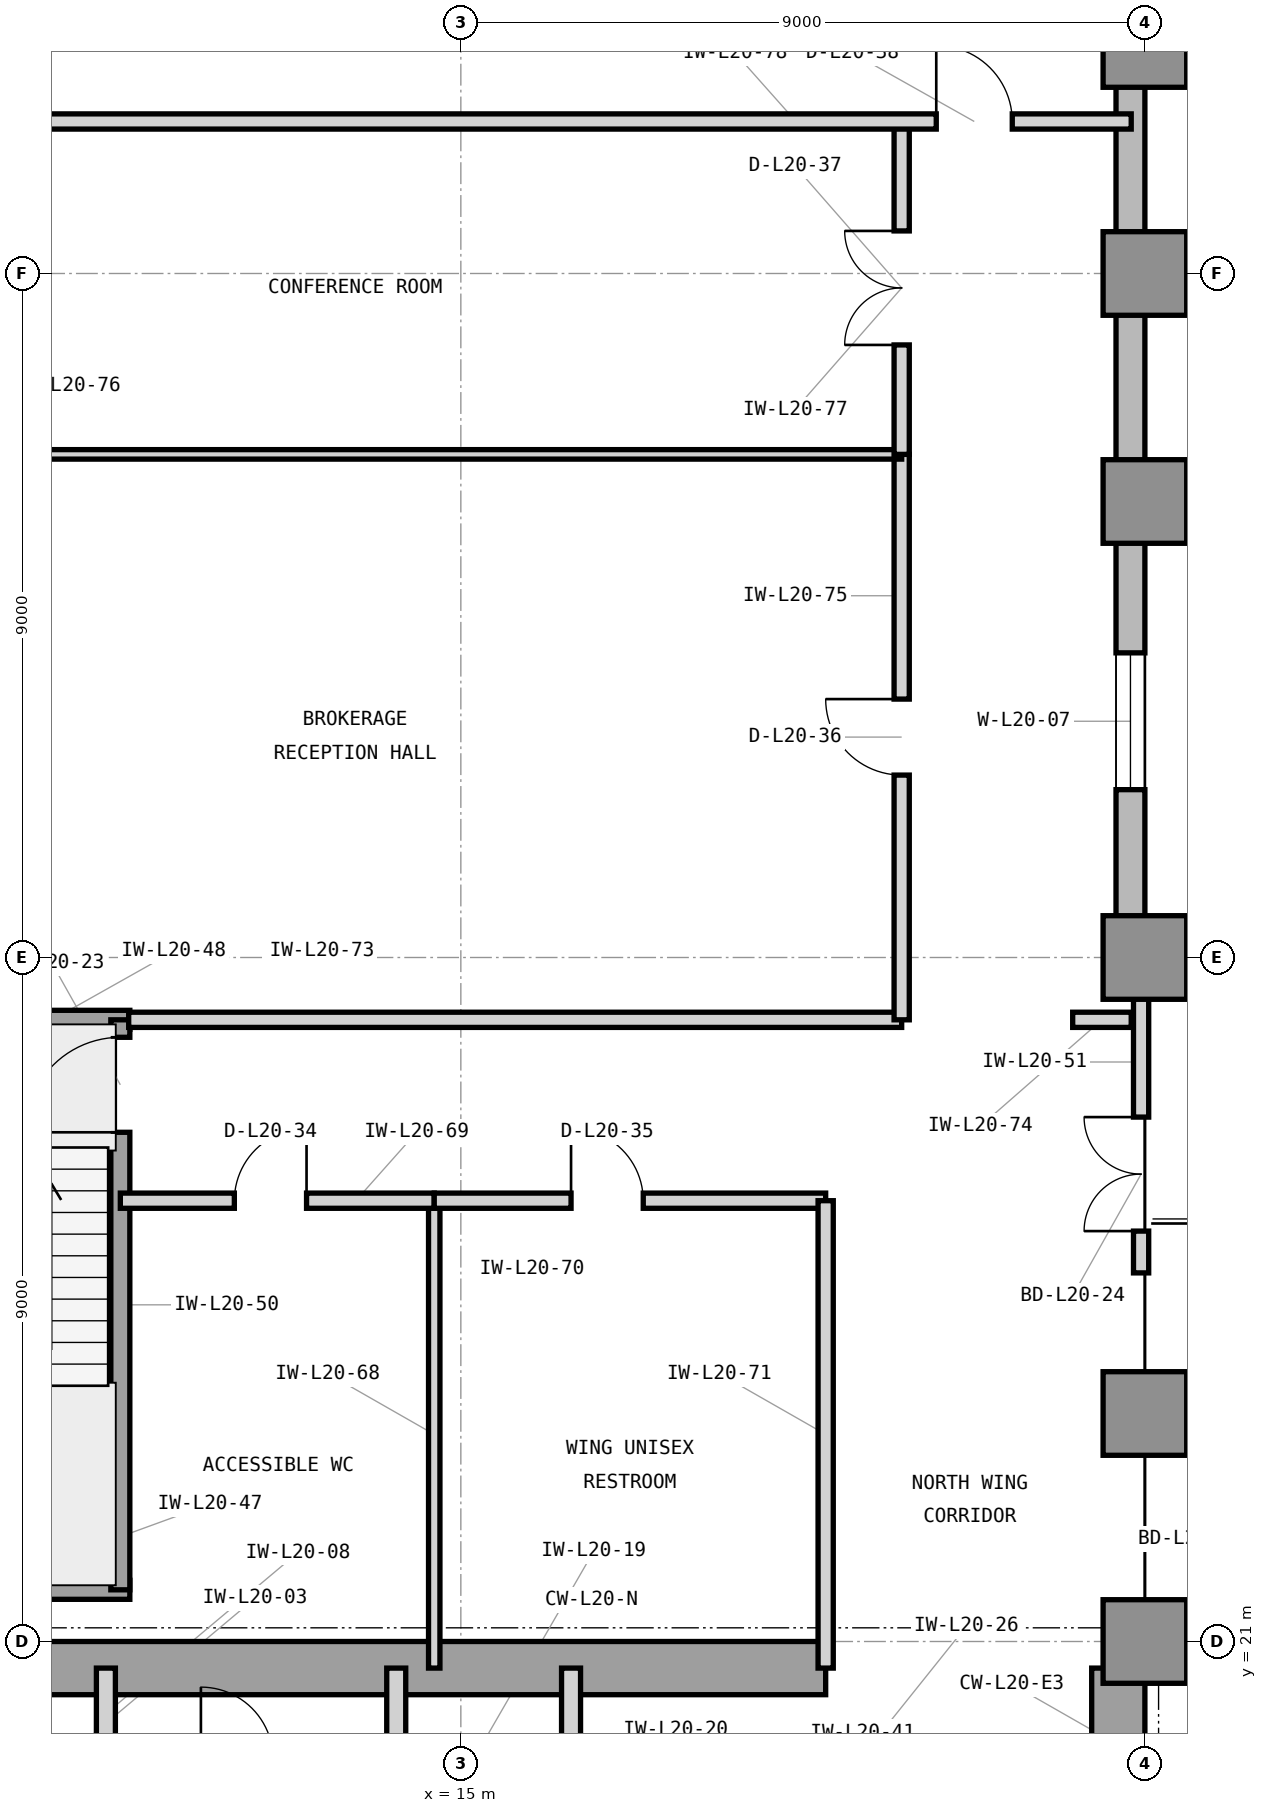
"""IFC4 building model, lengths in metres.
Left out: names, types, materials, properties, quantities, classifications, styles, units other than length and angle.
Written with IfcOpenShell. Run it as: python <this file> out.ifc"""

import sys

from ifc_helpers import new_model, si_unit, direction, frame, frame_2d, origin, origin_2d, place, context, subcontext, project, spatial, rectangle, extrude, element, fill, save


model = new_model("IFC4")
c1 = context("Model", 3, precision=1e-05, world=origin(), true_north=direction((0.0, 1.0)))
c2 = subcontext(c1, "Body", "Model", "MODEL_VIEW")
j1 = project(units=[si_unit("LENGTHUNIT", "METRE"), si_unit("PLANEANGLEUNIT", "RADIAN")], contexts=[c1])
p1 = place(None, origin())
s1 = spatial("IfcSite", under=j1, at=p1, CompositionType="ELEMENT")
p2 = place(p1, origin())
s2 = spatial("IfcBuilding", under=s1, at=p2, CompositionType="ELEMENT")
p3 = place(p2, frame((0.0, 0.0, 89.1)))
s3 = spatial("IfcBuildingStorey", under=s2, at=p3, CompositionType="ELEMENT", Elevation=89.1)
p4 = place(p3, frame((7.475, 20.65, 0.0), z_axis=(0.0, 0.0, 1.0), x_axis=(1.0, 0.0, 0.0)))
e1 = element("IfcWall", 1, at=p4, inside=s3, PredefinedType="SHEAR", context=c2, shape_type="SweptSolid", body=[
    extrude(rectangle(XDim=12.325, YDim=0.7, at=frame_2d((6.163, 0.0))), origin(), (0.0, 0.0, 1.0), 4.2),
])
p5 = place(p3, frame((23.65, 16.6, 0.0), z_axis=(0.0, 0.0, 1.0), x_axis=(0.0, 1.0, 0.0)))
e2 = element("IfcWall", 2, at=p5, inside=s3, PredefinedType="SHEAR", context=c2, shape_type="SweptSolid", body=[
    extrude(rectangle(XDim=4.05, YDim=0.7, at=frame_2d((2.025, 0.0))), origin(), (0.0, 0.0, 1.0), 4.2),
])
for number, where, z_axis, x_axis in (
    (3, (24.0, 21.0, 0.0), (0.0, 0.0, 1.0), (1.0, 0.0, 0.0)),
    (4, (24.0, 24.0, 0.0), (0.0, 0.0, 1.0), (1.0, 0.0, 0.0)),
    (5, (24.0, 30.0, 0.0), (0.0, 0.0, 1.0), (1.0, 0.0, 0.0)),
    (6, (24.0, 36.0, 0.0), (0.0, 0.0, 1.0), (1.0, 0.0, 0.0)),
    (7, (24.0, 39.0, 0.0), (0.0, 0.0, 1.0), (1.0, 0.0, 0.0)),
    (8, (24.0, 42.0, 0.0), (0.0, 0.0, 1.0), (1.0, 0.0, 0.0)),
):
    element("IfcColumn", number, at=place(p3, frame(where, z_axis=z_axis, x_axis=x_axis)), inside=s3, PredefinedType="COLUMN", context=c2, shape_type="SweptSolid", body=[
        extrude(rectangle(XDim=1.1, YDim=1.1, at=origin_2d()), origin(), (0.0, 0.0, 1.0), 4.2),
    ])
p6 = place(p3, frame((23.81, 30.45, 0.0), z_axis=(0.0, 0.0, 1.0), x_axis=(0.0, 1.0, 0.0)))
e9 = element("IfcWall", 9, at=p6, inside=s3, PredefinedType="STANDARD", context=c2, shape_type="SweptSolid", body=[
    extrude(rectangle(XDim=15.95, YDim=0.38, at=frame_2d((7.975, 0.0))), origin(), (0.0, 0.0, 1.0), 4.0),
])
p7 = place(p6, frame((1.758, 0.0, 0.85)))
e10 = element("IfcOpeningElement", 10, at=p7, cuts=e9, PredefinedType="OPENING", context=c2, shape_type="SweptSolid", body=[
    extrude(rectangle(XDim=1.8, YDim=2.25, at=frame_2d((0.9, 1.125))), frame((0.0, 0.2, 0.0), z_axis=(0.0, -1.0, 0.0), x_axis=(1.0, 0.0, 0.0)), (0.0, 0.0, 1.0), 0.4),
])
p8 = place(p3, frame((10.33, 19.45, 0.0), z_axis=(0.0, 0.0, 1.0), x_axis=(0.0, 1.0, 0.0)))
e11 = element("IfcWall", 11, at=p8, inside=s3, PredefinedType="PARTITIONING", context=c2, shape_type="SweptSolid", body=[
    extrude(rectangle(XDim=1.2, YDim=0.25, at=frame_2d((0.6, 0.0))), origin(), (0.0, 0.0, 1.0), 3.217),
])
for number, where, z_axis, x_axis in (
    (12, (14.15, 16.7, 0.0), (0.0, 0.0, 1.0), (0.0, 1.0, 0.0)),
    (13, (16.45, 16.7, 0.0), (0.0, 0.0, 1.0), (0.0, 1.0, 0.0)),
):
    element("IfcWall", number, at=place(p3, frame(where, z_axis=z_axis, x_axis=x_axis)), inside=s3, PredefinedType="PARTITIONING", context=c2, shape_type="SweptSolid", body=[
        extrude(rectangle(XDim=3.95, YDim=0.25, at=frame_2d((1.975, 0.0))), origin(), (0.0, 0.0, 1.0), 3.93),
    ])
for number, where, z_axis, x_axis in (
    (14, (6.555, 21.68, 0.0), (0.0, 0.0, 1.0), (1.0, 0.0, 0.0)),
    (15, (6.555, 29.18, 0.0), (0.0, 0.0, 1.0), (1.0, 0.0, 0.0)),
):
    element("IfcWall", number, at=place(p3, frame(where, z_axis=z_axis, x_axis=x_axis)), inside=s3, PredefinedType="SHEAR", context=c2, shape_type="SweptSolid", body=[
        extrude(rectangle(XDim=4.09, YDim=0.25, at=frame_2d((2.045, 0.0))), origin(), (0.0, 0.0, 1.0), 4.2),
    ])
p9 = place(p3, frame((10.52, 21.68, 0.0), z_axis=(0.0, 0.0, 1.0), x_axis=(0.0, 1.0, 0.0)))
e16 = element("IfcWall", 16, at=p9, inside=s3, PredefinedType="SHEAR", context=c2, shape_type="SweptSolid", body=[
    extrude(rectangle(XDim=7.5, YDim=0.25, at=frame_2d((3.75, 0.0))), origin(), (0.0, 0.0, 1.0), 4.2),
])
p10 = place(p9, frame((6.02, 0.0, 0.0)))
e17 = element("IfcOpeningElement", 17, at=p10, cuts=e16, PredefinedType="OPENING", context=c2, shape_type="SweptSolid", body=[
    extrude(rectangle(XDim=1.25, YDim=2.2, at=frame_2d((0.625, 1.1))), frame((0.0, 0.135, 0.0), z_axis=(0.0, -1.0, 0.0), x_axis=(1.0, 0.0, 0.0)), (0.0, 0.0, 1.0), 0.27),
])
p11 = place(p3, frame((23.95, 25.85, 0.0), z_axis=(0.0, 0.0, 1.0), x_axis=(0.0, 1.0, 0.0)))
e18 = element("IfcWall", 18, at=p11, inside=s3, PredefinedType="PARTITIONING", context=c2, shape_type="SweptSolid", body=[
    extrude(rectangle(XDim=3.7, YDim=0.2, at=frame_2d((1.85, 0.0))), origin(), (0.0, 0.0, 1.0), 3.313),
])
p12 = place(p11, frame((0.55, 0.0, 0.0)))
e19 = element("IfcOpeningElement", 19, at=p12, cuts=e18, PredefinedType="OPENING", context=c2, shape_type="SweptSolid", body=[
    extrude(rectangle(XDim=1.5, YDim=2.3, at=frame_2d((0.75, 1.15))), frame((0.0, 0.11, 0.0), z_axis=(0.0, -1.0, 0.0), x_axis=(1.0, 0.0, 0.0)), (0.0, 0.0, 1.0), 0.22),
])
p13 = place(p3, frame((24.05, 20.95, 0.0), z_axis=(0.0, 0.0, 1.0), x_axis=(1.0, 0.0, 0.0)))
e20 = element("IfcWall", 20, at=p13, inside=s3, PredefinedType="PARTITIONING", context=c2, shape_type="SweptSolid", body=[
    extrude(rectangle(XDim=8.5, YDim=0.2, at=frame_2d((4.25, 0.0))), origin(), (0.0, 0.0, 1.0), 3.313),
])
p14 = place(p13, frame((0.6, 0.0, 0.0)))
e21 = element("IfcOpeningElement", 21, at=p14, cuts=e20, PredefinedType="OPENING", context=c2, shape_type="SweptSolid", body=[
    extrude(rectangle(XDim=1.5, YDim=2.3, at=frame_2d((0.75, 1.15))), frame((0.0, 0.11, 0.0), z_axis=(0.0, -1.0, 0.0), x_axis=(1.0, 0.0, 0.0)), (0.0, 0.0, 1.0), 0.22),
])
p15 = place(p3, frame((14.65, 20.65, 0.0), z_axis=(0.0, 0.0, 1.0), x_axis=(0.0, 1.0, 0.0)))
e22 = element("IfcWall", 22, at=p15, inside=s3, PredefinedType="PARTITIONING", context=c2, shape_type="SweptSolid", body=[
    extrude(rectangle(XDim=6.15, YDim=0.15, at=frame_2d((3.075, 0.0))), origin(), (0.0, 0.0, 1.0), 3.93),
])
p16 = place(p3, frame((10.52, 26.8, 0.0), z_axis=(0.0, 0.0, 1.0), x_axis=(1.0, 0.0, 0.0)))
e23 = element("IfcWall", 23, at=p16, inside=s3, PredefinedType="PARTITIONING", context=c2, shape_type="SweptSolid", body=[
    extrude(rectangle(XDim=4.13, YDim=0.2, at=frame_2d((2.065, 0.0))), origin(), (0.0, 0.0, 1.0), 3.93),
])
p17 = place(p16, frame((1.5, 0.0, 0.0)))
e24 = element("IfcOpeningElement", 24, at=p17, cuts=e23, PredefinedType="OPENING", context=c2, shape_type="SweptSolid", body=[
    extrude(rectangle(XDim=0.95, YDim=2.1, at=frame_2d((0.475, 1.05))), frame((0.0, 0.11, 0.0), z_axis=(0.0, -1.0, 0.0), x_axis=(1.0, 0.0, 0.0)), (0.0, 0.0, 1.0), 0.22),
])
p18 = place(p3, frame((14.65, 26.8, 0.0), z_axis=(0.0, 0.0, 1.0), x_axis=(1.0, 0.0, 0.0)))
e25 = element("IfcWall", 25, at=p18, inside=s3, PredefinedType="PARTITIONING", context=c2, shape_type="SweptSolid", body=[
    extrude(rectangle(XDim=5.15, YDim=0.2, at=frame_2d((2.575, 0.0))), origin(), (0.0, 0.0, 1.0), 3.93),
])
p19 = place(p18, frame((1.8, 0.0, 0.0)))
e26 = element("IfcOpeningElement", 26, at=p19, cuts=e25, PredefinedType="OPENING", context=c2, shape_type="SweptSolid", body=[
    extrude(rectangle(XDim=0.95, YDim=2.1, at=frame_2d((0.475, 1.05))), frame((0.0, 0.11, 0.0), z_axis=(0.0, -1.0, 0.0), x_axis=(1.0, 0.0, 0.0)), (0.0, 0.0, 1.0), 0.22),
])
p20 = place(p3, frame((19.8, 20.65, 0.0), z_axis=(0.0, 0.0, 1.0), x_axis=(0.0, 1.0, 0.0)))
e27 = element("IfcWall", 27, at=p20, inside=s3, PredefinedType="PARTITIONING", context=c2, shape_type="SweptSolid", body=[
    extrude(rectangle(XDim=6.15, YDim=0.2, at=frame_2d((3.075, 0.0))), origin(), (0.0, 0.0, 1.0), 3.93),
])
p21 = place(p3, frame((10.63, 29.18, 0.0), z_axis=(0.0, 0.0, 1.0), x_axis=(1.0, 0.0, 0.0)))
e28 = element("IfcWall", 28, at=p21, inside=s3, PredefinedType="PARTITIONING", context=c2, shape_type="SweptSolid", body=[
    extrude(rectangle(XDim=10.17, YDim=0.2, at=frame_2d((5.085, 0.0))), origin(), (0.0, 0.0, 1.0), 3.93),
])
p22 = place(p3, frame((23.05, 29.18, 0.0), z_axis=(0.0, 0.0, 1.0), x_axis=(1.0, 0.0, 0.0)))
e29 = element("IfcWall", 29, at=p22, inside=s3, PredefinedType="PARTITIONING", context=c2, shape_type="SweptSolid", body=[
    extrude(rectangle(XDim=0.77, YDim=0.2, at=frame_2d((0.385, 0.0))), origin(), (0.0, 0.0, 1.0), 3.93),
])
p23 = place(p3, frame((20.8, 29.18, 0.0), z_axis=(0.0, 0.0, 1.0), x_axis=(0.0, 1.0, 0.0)))
e30 = element("IfcWall", 30, at=p23, inside=s3, PredefinedType="PARTITIONING", context=c2, shape_type="SweptSolid", body=[
    extrude(rectangle(XDim=7.44, YDim=0.2, at=frame_2d((3.72, 0.0))), origin(), (0.0, 0.0, 1.0), 3.93),
])
p24 = place(p23, frame((3.22, 0.0, 0.0)))
e31 = element("IfcOpeningElement", 31, at=p24, cuts=e30, PredefinedType="OPENING", context=c2, shape_type="SweptSolid", body=[
    extrude(rectangle(XDim=1.0, YDim=2.15, at=frame_2d((0.5, 1.075))), frame((0.0, 0.11, 0.0), z_axis=(0.0, -1.0, 0.0), x_axis=(1.0, 0.0, 0.0)), (0.0, 0.0, 1.0), 0.22),
])
p25 = place(p3, frame((6.18, 36.62, 0.0), z_axis=(0.0, 0.0, 1.0), x_axis=(1.0, 0.0, 0.0)))
e32 = element("IfcWall", 32, at=p25, inside=s3, PredefinedType="PARTITIONING", context=c2, shape_type="SweptSolid", body=[
    extrude(rectangle(XDim=14.62, YDim=0.125, at=frame_2d((7.31, 0.0))), origin(), (0.0, 0.0, 1.0), 3.93),
])
p26 = place(p3, frame((20.8, 36.62, 0.0), z_axis=(0.0, 0.0, 1.0), x_axis=(0.0, 1.0, 0.0)))
e33 = element("IfcWall", 33, at=p26, inside=s3, PredefinedType="PARTITIONING", context=c2, shape_type="SweptSolid", body=[
    extrude(rectangle(XDim=4.38, YDim=0.2, at=frame_2d((2.19, 0.0))), origin(), (0.0, 0.0, 1.0), 3.93),
])
p27 = place(p26, frame((1.44, 0.0, 0.0)))
e34 = element("IfcOpeningElement", 34, at=p27, cuts=e33, PredefinedType="OPENING", context=c2, shape_type="SweptSolid", body=[
    extrude(rectangle(XDim=1.5, YDim=2.3, at=frame_2d((0.75, 1.15))), frame((0.0, 0.11, 0.0), z_axis=(0.0, -1.0, 0.0), x_axis=(1.0, 0.0, 0.0)), (0.0, 0.0, 1.0), 0.22),
])
p28 = place(p3, frame((6.18, 41.0, 0.0), z_axis=(0.0, 0.0, 1.0), x_axis=(1.0, 0.0, 0.0)))
e35 = element("IfcWall", 35, at=p28, inside=s3, PredefinedType="PARTITIONING", context=c2, shape_type="SweptSolid", body=[
    extrude(rectangle(XDim=17.64, YDim=0.2, at=frame_2d((8.82, 0.0))), origin(), (0.0, 0.0, 1.0), 3.93),
])
p29 = place(p28, frame((15.075, 0.0, 0.0)))
e36 = element("IfcOpeningElement", 36, at=p29, cuts=e35, PredefinedType="OPENING", context=c2, shape_type="SweptSolid", body=[
    extrude(rectangle(XDim=1.0, YDim=2.15, at=frame_2d((0.5, 1.075))), frame((0.0, 0.11, 0.0), z_axis=(0.0, -1.0, 0.0), x_axis=(1.0, 0.0, 0.0)), (0.0, 0.0, 1.0), 0.22),
])
p30 = place(p7, origin())
e37 = element("IfcWindow", 37, at=p30, inside=s3, PartitioningType="SINGLE_PANEL", PredefinedType="WINDOW", context=c2, shape_type="SweptSolid", body=[
    extrude(rectangle(XDim=1.8, YDim=2.25, at=frame_2d((0.9, 1.125))), frame((0.0, 0.11, 0.0), z_axis=(0.0, -1.0, 0.0), x_axis=(1.0, 0.0, 0.0)), (0.0, 0.0, 1.0), 0.06),
])
fill(e10, e37)
p31 = place(p10, origin())
e38 = element("IfcDoor", 38, at=p31, inside=s3, OperationType="SINGLE_SWING_LEFT", PredefinedType="DOOR", context=c2, shape_type="SweptSolid", body=[
    extrude(rectangle(XDim=1.25, YDim=2.2, at=frame_2d((0.625, 1.1))), frame((0.0, 0.025, 0.0), z_axis=(0.0, -1.0, 0.0), x_axis=(1.0, 0.0, 0.0)), (0.0, 0.0, 1.0), 0.05),
])
fill(e17, e38)
p32 = place(p12, origin())
e39 = element("IfcDoor", 39, at=p32, inside=s3, OperationType="DOUBLE_DOOR_SINGLE_SWING", PredefinedType="DOOR", context=c2, shape_type="SweptSolid", body=[
    extrude(rectangle(XDim=1.5, YDim=2.3, at=frame_2d((0.75, 1.15))), frame((0.0, 0.025, 0.0), z_axis=(0.0, -1.0, 0.0), x_axis=(1.0, 0.0, 0.0)), (0.0, 0.0, 1.0), 0.05),
])
fill(e19, e39)
p33 = place(p17, origin())
e40 = element("IfcDoor", 40, at=p33, inside=s3, OperationType="SINGLE_SWING_RIGHT", PredefinedType="DOOR", context=c2, shape_type="SweptSolid", body=[
    extrude(rectangle(XDim=0.95, YDim=2.1, at=frame_2d((0.475, 1.05))), frame((0.0, 0.025, 0.0), z_axis=(0.0, -1.0, 0.0), x_axis=(1.0, 0.0, 0.0)), (0.0, 0.0, 1.0), 0.05),
])
fill(e24, e40)
p34 = place(p19, origin())
e41 = element("IfcDoor", 41, at=p34, inside=s3, OperationType="SINGLE_SWING_LEFT", PredefinedType="DOOR", context=c2, shape_type="SweptSolid", body=[
    extrude(rectangle(XDim=0.95, YDim=2.1, at=frame_2d((0.475, 1.05))), frame((0.0, 0.025, 0.0), z_axis=(0.0, -1.0, 0.0), x_axis=(1.0, 0.0, 0.0)), (0.0, 0.0, 1.0), 0.05),
])
fill(e26, e41)
p35 = place(p24, origin())
e42 = element("IfcDoor", 42, at=p35, inside=s3, OperationType="SINGLE_SWING_RIGHT", PredefinedType="DOOR", context=c2, shape_type="SweptSolid", body=[
    extrude(rectangle(XDim=1.0, YDim=2.15, at=frame_2d((0.5, 1.075))), frame((0.0, 0.025, 0.0), z_axis=(0.0, -1.0, 0.0), x_axis=(1.0, 0.0, 0.0)), (0.0, 0.0, 1.0), 0.05),
])
fill(e31, e42)
p36 = place(p27, origin())
e43 = element("IfcDoor", 43, at=p36, inside=s3, OperationType="DOUBLE_DOOR_SINGLE_SWING", PredefinedType="DOOR", context=c2, shape_type="SweptSolid", body=[
    extrude(rectangle(XDim=1.5, YDim=2.3, at=frame_2d((0.75, 1.15))), frame((0.0, 0.025, 0.0), z_axis=(0.0, -1.0, 0.0), x_axis=(1.0, 0.0, 0.0)), (0.0, 0.0, 1.0), 0.05),
])
fill(e34, e43)
p37 = place(p29, origin())
e44 = element("IfcDoor", 44, at=p37, inside=s3, OperationType="SINGLE_SWING_LEFT", PredefinedType="DOOR", context=c2, shape_type="SweptSolid", body=[
    extrude(rectangle(XDim=1.0, YDim=2.15, at=frame_2d((0.5, 1.075))), frame((0.0, 0.025, 0.0), z_axis=(0.0, -1.0, 0.0), x_axis=(1.0, 0.0, 0.0)), (0.0, 0.0, 1.0), 0.05),
])
fill(e36, e44)
save(model, sys.argv[1])
